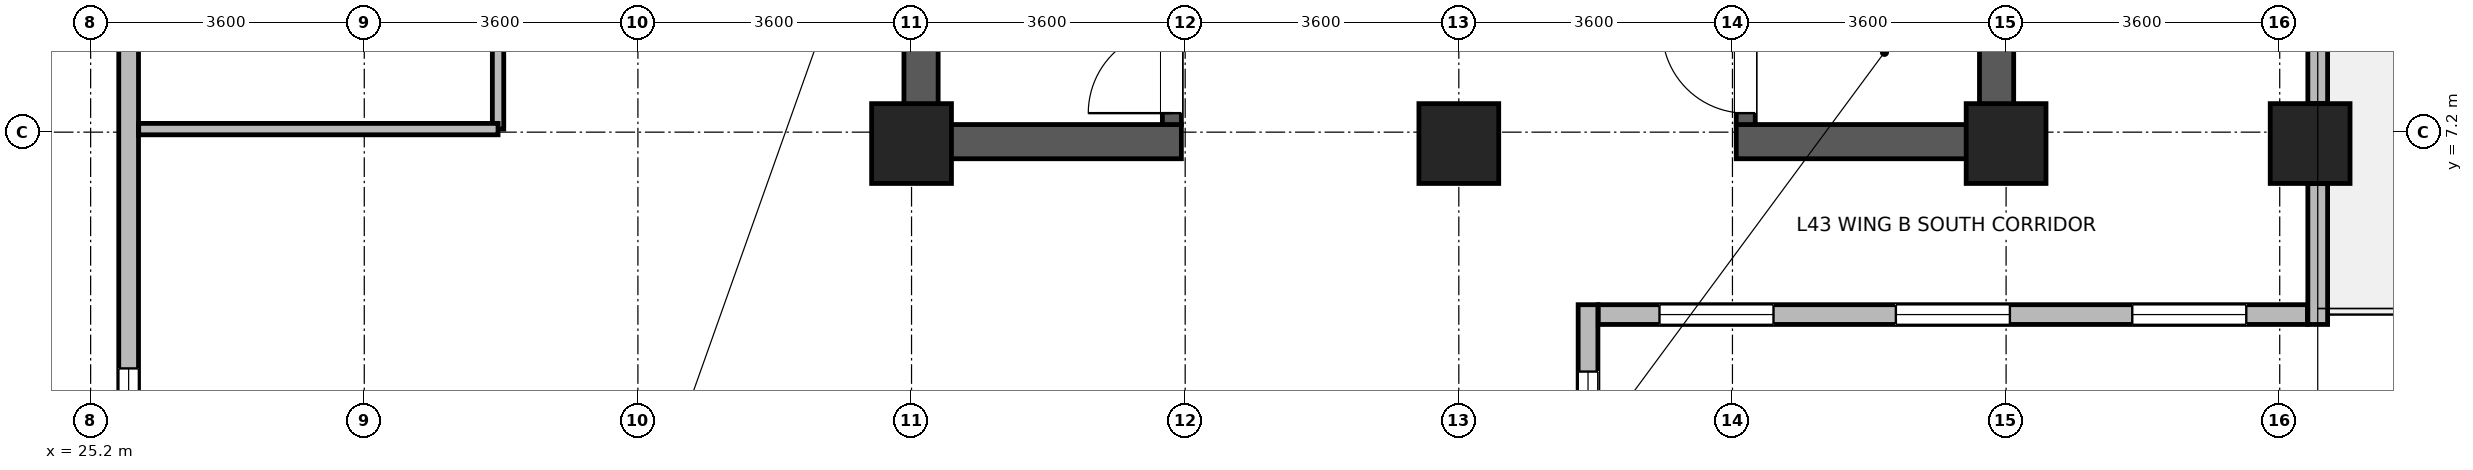
"""IFC4 building model, lengths in metres.
Left out: names, types, materials, properties, quantities, classifications, styles, units other than length and angle.
Written with IfcOpenShell. Run it as: python <this file> out.ifc"""

import sys

from ifc_helpers import new_model, si_unit, direction, frame, frame_2d, origin, origin_2d, place, context, subcontext, project, spatial, rectangle, extrude, source, transform, mapped, element, fill, save


model = new_model("IFC4")
c1 = context("Model", 3, precision=1e-05, world=origin(), true_north=direction((0.0, 1.0)))
c2 = subcontext(c1, "Body", "Model", "MODEL_VIEW")
j1 = project(units=[si_unit("LENGTHUNIT", "METRE"), si_unit("PLANEANGLEUNIT", "RADIAN")], contexts=[c1])
p1 = place(None, origin())
s1 = spatial("IfcSite", under=j1, at=p1, CompositionType="ELEMENT")
p2 = place(p1, origin())
s2 = spatial("IfcBuilding", under=s1, at=p2, CompositionType="ELEMENT")
p3 = place(p2, frame((0.0, 0.0, 169.8)))
s3 = spatial("IfcBuildingStorey", under=s2, at=p3, CompositionType="ELEMENT", Elevation=169.8)
for number, where, z_axis, x_axis in (
    (1, (36.125, 6.85, 0.0), (0.0, 0.0, 1.0), (0.0, 1.0, 0.0)),
    (2, (50.275, 6.85, 0.0), (0.0, 0.0, 1.0), (0.0, 1.0, 0.0)),
):
    element("IfcWall", number, at=place(p3, frame(where, z_axis=z_axis, x_axis=x_axis)), inside=s3, PredefinedType="SHEAR", context=c2, shape_type="SweptSolid", body=[
        extrude(rectangle(XDim=7.9, YDim=0.45, at=frame_2d((3.95, 0.0))), origin(), (0.0, 0.0, 1.0), 3.46),
    ])
for number, where, z_axis, x_axis in (
    (3, (36.35, 7.075, 0.0), (0.0, 0.0, 1.0), (1.0, 0.0, 0.0)),
    (4, (46.85, 7.075, 0.0), (0.0, 0.0, 1.0), (1.0, 0.0, 0.0)),
):
    element("IfcWall", number, at=place(p3, frame(where, z_axis=z_axis, x_axis=x_axis)), inside=s3, PredefinedType="SHEAR", context=c2, shape_type="SweptSolid", body=[
        extrude(rectangle(XDim=3.2, YDim=0.45, at=frame_2d((1.6, 0.0))), origin(), (0.0, 0.0, 1.0), 3.46),
    ])
p4 = place(p3, frame((39.425, 7.3, 0.0), z_axis=(0.0, 0.0, 1.0), x_axis=(0.0, 1.0, 0.0)))
e5 = element("IfcWall", 5, at=p4, inside=s3, PredefinedType="SHEAR", context=c2, shape_type="SweptSolid", body=[
    extrude(rectangle(XDim=7.0, YDim=0.25, at=frame_2d((3.5, 0.0))), origin(), (0.0, 0.0, 1.0), 3.46),
])
p5 = place(p4, frame((0.15, 0.0, 0.0)))
e6 = element("IfcOpeningElement", 6, at=p5, cuts=e5, PredefinedType="OPENING", context=c2, shape_type="SweptSolid", body=[
    extrude(rectangle(XDim=1.1, YDim=2.08, at=frame_2d((0.55, 1.04))), frame((0.0, 0.135, 0.0), z_axis=(0.0, -1.0, 0.0), x_axis=(1.0, 0.0, 0.0)), (0.0, 0.0, 1.0), 0.27),
])
p6 = place(p3, frame((46.975, 7.3, 0.0), z_axis=(0.0, 0.0, 1.0), x_axis=(0.0, 1.0, 0.0)))
e7 = element("IfcWall", 7, at=p6, inside=s3, PredefinedType="SHEAR", context=c2, shape_type="SweptSolid", body=[
    extrude(rectangle(XDim=7.0, YDim=0.25, at=frame_2d((3.5, 0.0))), origin(), (0.0, 0.0, 1.0), 3.46),
])
p7 = place(p6, frame((0.15, 0.0, 0.0)))
e8 = element("IfcOpeningElement", 8, at=p7, cuts=e7, PredefinedType="OPENING", context=c2, shape_type="SweptSolid", body=[
    extrude(rectangle(XDim=1.1, YDim=2.08, at=frame_2d((0.55, 1.04))), frame((0.0, 0.135, 0.0), z_axis=(0.0, -1.0, 0.0), x_axis=(1.0, 0.0, 0.0)), (0.0, 0.0, 1.0), 0.27),
])
m1 = source(origin(), c2, "Body", "SweptSolid", [
    extrude(rectangle(XDim=1.05, YDim=1.05, at=origin_2d()), origin(), (0.0, 0.0, 1.0), 3.7),
])
for number, where, z_axis, x_axis in (
    (9, (36.0, 7.05, 0.0), (0.0, 0.0, 1.0), (1.0, 0.0, 0.0)),
    (10, (43.2, 7.05, 0.0), (0.0, 0.0, 1.0), (1.0, 0.0, 0.0)),
    (11, (50.4, 7.05, 0.0), (0.0, 0.0, 1.0), (1.0, 0.0, 0.0)),
    (12, (54.4, 7.05, 0.0), (0.0, 0.0, 1.0), (1.0, 0.0, 0.0)),
):
    element("IfcColumn", number, at=place(p3, frame(where, z_axis=z_axis, x_axis=x_axis)), inside=s3, PredefinedType="COLUMN", context=c2, shape_type="MappedRepresentation", body=[
        mapped(m1, transform((0.0, 0.0, 0.0), x_axis=(1.0, 0.0, 0.0), y_axis=(0.0, 1.0, 0.0), z_axis=(0.0, 0.0, 1.0), scale=1.0)),
    ])
p8 = place(p3, frame((44.9, 4.93, 0.0), z_axis=(0.0, 0.0, 1.0), x_axis=(0.0, -1.0, 0.0)))
e13 = element("IfcWall", 13, at=p8, inside=s3, PredefinedType="STANDARD", context=c2, shape_type="SweptSolid", body=[
    extrude(rectangle(XDim=3.26, YDim=0.26, at=frame_2d((1.63, 0.0))), origin(), (0.0, 0.0, 1.0), 3.44),
])
p9 = place(p8, frame((0.88, 0.0, 0.85)))
e14 = element("IfcOpeningElement", 14, at=p9, cuts=e13, PredefinedType="OPENING", context=c2, shape_type="SweptSolid", body=[
    extrude(rectangle(XDim=1.5, YDim=1.85, at=frame_2d((0.75, 0.925))), frame((0.0, 0.14, 0.0), z_axis=(0.0, -1.0, 0.0), x_axis=(1.0, 0.0, 0.0)), (0.0, 0.0, 1.0), 0.28),
])
p10 = place(p3, frame((54.365, 4.8, 0.0), z_axis=(0.0, 0.0, 1.0), x_axis=(-1.0, 0.0, 0.0)))
e15 = element("IfcWall", 15, at=p10, inside=s3, PredefinedType="STANDARD", context=c2, shape_type="SweptSolid", body=[
    extrude(rectangle(XDim=9.33, YDim=0.26, at=frame_2d((4.665, 0.0))), origin(), (0.0, 0.0, 1.0), 3.44),
])
p11 = place(p10, frame((0.805, 0.0, 0.85)))
e16 = element("IfcOpeningElement", 16, at=p11, cuts=e15, PredefinedType="OPENING", context=c2, shape_type="SweptSolid", body=[
    extrude(rectangle(XDim=1.5, YDim=1.85, at=frame_2d((0.75, 0.925))), frame((0.0, 0.14, 0.0), z_axis=(0.0, -1.0, 0.0), x_axis=(1.0, 0.0, 0.0)), (0.0, 0.0, 1.0), 0.28),
])
p12 = place(p10, frame((3.915, 0.0, 0.85)))
e17 = element("IfcOpeningElement", 17, at=p12, cuts=e15, PredefinedType="OPENING", context=c2, shape_type="SweptSolid", body=[
    extrude(rectangle(XDim=1.5, YDim=1.85, at=frame_2d((0.75, 0.925))), frame((0.0, 0.14, 0.0), z_axis=(0.0, -1.0, 0.0), x_axis=(1.0, 0.0, 0.0)), (0.0, 0.0, 1.0), 0.28),
])
p13 = place(p10, frame((7.025, 0.0, 0.85)))
e18 = element("IfcOpeningElement", 18, at=p13, cuts=e15, PredefinedType="OPENING", context=c2, shape_type="SweptSolid", body=[
    extrude(rectangle(XDim=1.5, YDim=1.85, at=frame_2d((0.75, 0.925))), frame((0.0, 0.14, 0.0), z_axis=(0.0, -1.0, 0.0), x_axis=(1.0, 0.0, 0.0)), (0.0, 0.0, 1.0), 0.28),
])
p14 = place(p3, frame((54.5, 6.524, 0.0), z_axis=(0.0, 0.0, 1.0), x_axis=(0.0, -1.0, 0.0)))
e19 = element("IfcWall", 19, at=p14, inside=s3, PredefinedType="STANDARD", context=c2, shape_type="SweptSolid", body=[
    extrude(rectangle(XDim=1.854, YDim=0.26, at=frame_2d((0.927, 0.0))), origin(), (0.0, 0.0, 1.0), 3.44),
])
p15 = place(p3, frame((54.5, 14.024, 0.0), z_axis=(0.0, 0.0, 1.0), x_axis=(0.0, -1.0, 0.0)))
e20 = element("IfcWall", 20, at=p15, inside=s3, PredefinedType="STANDARD", context=c2, shape_type="SweptSolid", body=[
    extrude(rectangle(XDim=6.448, YDim=0.26, at=frame_2d((3.224, 0.0))), origin(), (0.0, 0.0, 1.0), 2.99),
])
p16 = place(p15, frame((4.086, 0.0, 0.85)))
e21 = element("IfcOpeningElement", 21, at=p16, cuts=e20, PredefinedType="OPENING", context=c2, shape_type="SweptSolid", body=[
    extrude(rectangle(XDim=1.5, YDim=1.85, at=frame_2d((0.75, 0.925))), frame((0.0, 0.14, 0.0), z_axis=(0.0, -1.0, 0.0), x_axis=(1.0, 0.0, 0.0)), (0.0, 0.0, 1.0), 0.28),
])
p17 = place(p15, frame((2.749, 0.0, 0.85)))
e22 = element("IfcOpeningElement", 22, at=p17, cuts=e20, PredefinedType="OPENING", context=c2, shape_type="SweptSolid", body=[
    extrude(rectangle(XDim=0.95, YDim=1.75, at=frame_2d((0.475, 0.875))), frame((0.0, 0.14, 0.0), z_axis=(0.0, -1.0, 0.0), x_axis=(1.0, 0.0, 0.0)), (0.0, 0.0, 1.0), 0.28),
])
p18 = place(p3, frame((25.7, 1.67, 0.0), z_axis=(0.0, 0.0, 1.0), x_axis=(0.0, 1.0, 0.0)))
e23 = element("IfcWall", 23, at=p18, inside=s3, PredefinedType="STANDARD", context=c2, shape_type="SweptSolid", body=[
    extrude(rectangle(XDim=20.06, YDim=0.26, at=frame_2d((10.03, 0.0))), origin(), (0.0, 0.0, 1.0), 3.44),
])
p19 = place(p18, frame((0.922, 0.0, 0.85)))
e24 = element("IfcOpeningElement", 24, at=p19, cuts=e23, PredefinedType="OPENING", context=c2, shape_type="SweptSolid", body=[
    extrude(rectangle(XDim=1.5, YDim=1.85, at=frame_2d((0.75, 0.925))), frame((0.0, 0.14, 0.0), z_axis=(0.0, -1.0, 0.0), x_axis=(1.0, 0.0, 0.0)), (0.0, 0.0, 1.0), 0.28),
])
p20 = place(p18, frame((7.608, 0.0, 0.85)))
e25 = element("IfcOpeningElement", 25, at=p20, cuts=e23, PredefinedType="OPENING", context=c2, shape_type="SweptSolid", body=[
    extrude(rectangle(XDim=1.5, YDim=1.85, at=frame_2d((0.75, 0.925))), frame((0.0, 0.14, 0.0), z_axis=(0.0, -1.0, 0.0), x_axis=(1.0, 0.0, 0.0)), (0.0, 0.0, 1.0), 0.28),
])
p21 = place(p18, frame((10.952, 0.0, 0.85)))
e26 = element("IfcOpeningElement", 26, at=p21, cuts=e23, PredefinedType="OPENING", context=c2, shape_type="SweptSolid", body=[
    extrude(rectangle(XDim=1.5, YDim=1.85, at=frame_2d((0.75, 0.925))), frame((0.0, 0.14, 0.0), z_axis=(0.0, -1.0, 0.0), x_axis=(1.0, 0.0, 0.0)), (0.0, 0.0, 1.0), 0.28),
])
p22 = place(p18, frame((14.295, 0.0, 0.85)))
e27 = element("IfcOpeningElement", 27, at=p22, cuts=e23, PredefinedType="OPENING", context=c2, shape_type="SweptSolid", body=[
    extrude(rectangle(XDim=1.5, YDim=1.85, at=frame_2d((0.75, 0.925))), frame((0.0, 0.14, 0.0), z_axis=(0.0, -1.0, 0.0), x_axis=(1.0, 0.0, 0.0)), (0.0, 0.0, 1.0), 0.28),
])
p23 = place(p18, frame((17.638, 0.0, 0.85)))
e28 = element("IfcOpeningElement", 28, at=p23, cuts=e23, PredefinedType="OPENING", context=c2, shape_type="SweptSolid", body=[
    extrude(rectangle(XDim=1.5, YDim=1.85, at=frame_2d((0.75, 0.925))), frame((0.0, 0.14, 0.0), z_axis=(0.0, -1.0, 0.0), x_axis=(1.0, 0.0, 0.0)), (0.0, 0.0, 1.0), 0.28),
])
p24 = place(p3, frame((30.56, 7.24, 0.0), z_axis=(0.0, 0.0, 1.0), x_axis=(0.0, 1.0, 0.0)))
e29 = element("IfcWall", 29, at=p24, inside=s3, PredefinedType="PARTITIONING", context=c2, shape_type="SweptSolid", body=[
    extrude(rectangle(XDim=7.26, YDim=0.15, at=frame_2d((3.63, 0.0))), origin(), (0.0, 0.0, 1.0), 3.44),
])
p25 = place(p24, frame((2.98, 0.0, 0.0)))
e30 = element("IfcOpeningElement", 30, at=p25, cuts=e29, PredefinedType="OPENING", context=c2, shape_type="SweptSolid", body=[
    extrude(rectangle(XDim=1.3, YDim=2.12, at=frame_2d((0.65, 1.06))), frame((0.0, 0.085, 0.0), z_axis=(0.0, -1.0, 0.0), x_axis=(1.0, 0.0, 0.0)), (0.0, 0.0, 1.0), 0.17),
])
p26 = place(p3, frame((25.832, 7.24, 0.0), z_axis=(0.0, 0.0, 1.0), x_axis=(1.0, 0.0, 0.0)))
e31 = element("IfcWall", 31, at=p26, inside=s3, PredefinedType="PARTITIONING", context=c2, shape_type="SweptSolid", body=[
    extrude(rectangle(XDim=4.728, YDim=0.15, at=frame_2d((2.364, 0.0))), origin(), (0.0, 0.0, 1.0), 3.44),
])
p27 = place(p9, origin())
e32 = element("IfcWindow", 32, at=p27, inside=s3, PartitioningType="SINGLE_PANEL", PredefinedType="WINDOW", context=c2, shape_type="SweptSolid", body=[
    extrude(rectangle(XDim=1.5, YDim=1.85, at=frame_2d((0.75, 0.925))), frame((0.0, 0.03, 0.0), z_axis=(0.0, -1.0, 0.0), x_axis=(1.0, 0.0, 0.0)), (0.0, 0.0, 1.0), 0.06),
])
fill(e14, e32)
p28 = place(p11, origin())
e33 = element("IfcWindow", 33, at=p28, inside=s3, PartitioningType="SINGLE_PANEL", PredefinedType="WINDOW", context=c2, shape_type="SweptSolid", body=[
    extrude(rectangle(XDim=1.5, YDim=1.85, at=frame_2d((0.75, 0.925))), frame((0.0, 0.03, 0.0), z_axis=(0.0, -1.0, 0.0), x_axis=(1.0, 0.0, 0.0)), (0.0, 0.0, 1.0), 0.06),
])
fill(e16, e33)
p29 = place(p12, origin())
e34 = element("IfcWindow", 34, at=p29, inside=s3, PartitioningType="SINGLE_PANEL", PredefinedType="WINDOW", context=c2, shape_type="SweptSolid", body=[
    extrude(rectangle(XDim=1.5, YDim=1.85, at=frame_2d((0.75, 0.925))), frame((0.0, 0.03, 0.0), z_axis=(0.0, -1.0, 0.0), x_axis=(1.0, 0.0, 0.0)), (0.0, 0.0, 1.0), 0.06),
])
fill(e17, e34)
p30 = place(p13, origin())
e35 = element("IfcWindow", 35, at=p30, inside=s3, PartitioningType="SINGLE_PANEL", PredefinedType="WINDOW", context=c2, shape_type="SweptSolid", body=[
    extrude(rectangle(XDim=1.5, YDim=1.85, at=frame_2d((0.75, 0.925))), frame((0.0, 0.03, 0.0), z_axis=(0.0, -1.0, 0.0), x_axis=(1.0, 0.0, 0.0)), (0.0, 0.0, 1.0), 0.06),
])
fill(e18, e35)
p31 = place(p19, origin())
e36 = element("IfcWindow", 36, at=p31, inside=s3, PartitioningType="SINGLE_PANEL", PredefinedType="WINDOW", context=c2, shape_type="SweptSolid", body=[
    extrude(rectangle(XDim=1.5, YDim=1.85, at=frame_2d((0.75, 0.925))), frame((0.0, 0.03, 0.0), z_axis=(0.0, -1.0, 0.0), x_axis=(1.0, 0.0, 0.0)), (0.0, 0.0, 1.0), 0.06),
])
fill(e24, e36)
p32 = place(p5, origin())
e37 = element("IfcDoor", 37, at=p32, inside=s3, OperationType="SINGLE_SWING_LEFT", PredefinedType="DOOR", context=c2, shape_type="SweptSolid", body=[
    extrude(rectangle(XDim=1.1, YDim=2.08, at=frame_2d((0.55, 1.04))), frame((0.0, 0.025, 0.0), z_axis=(0.0, -1.0, 0.0), x_axis=(1.0, 0.0, 0.0)), (0.0, 0.0, 1.0), 0.05),
])
fill(e6, e37)
p33 = place(p7, origin())
e38 = element("IfcDoor", 38, at=p33, inside=s3, OperationType="SINGLE_SWING_RIGHT", PredefinedType="DOOR", context=c2, shape_type="SweptSolid", body=[
    extrude(rectangle(XDim=1.1, YDim=2.08, at=frame_2d((0.55, 1.04))), frame((0.0, 0.025, 0.0), z_axis=(0.0, -1.0, 0.0), x_axis=(1.0, 0.0, 0.0)), (0.0, 0.0, 1.0), 0.05),
])
fill(e8, e38)
save(model, sys.argv[1])
